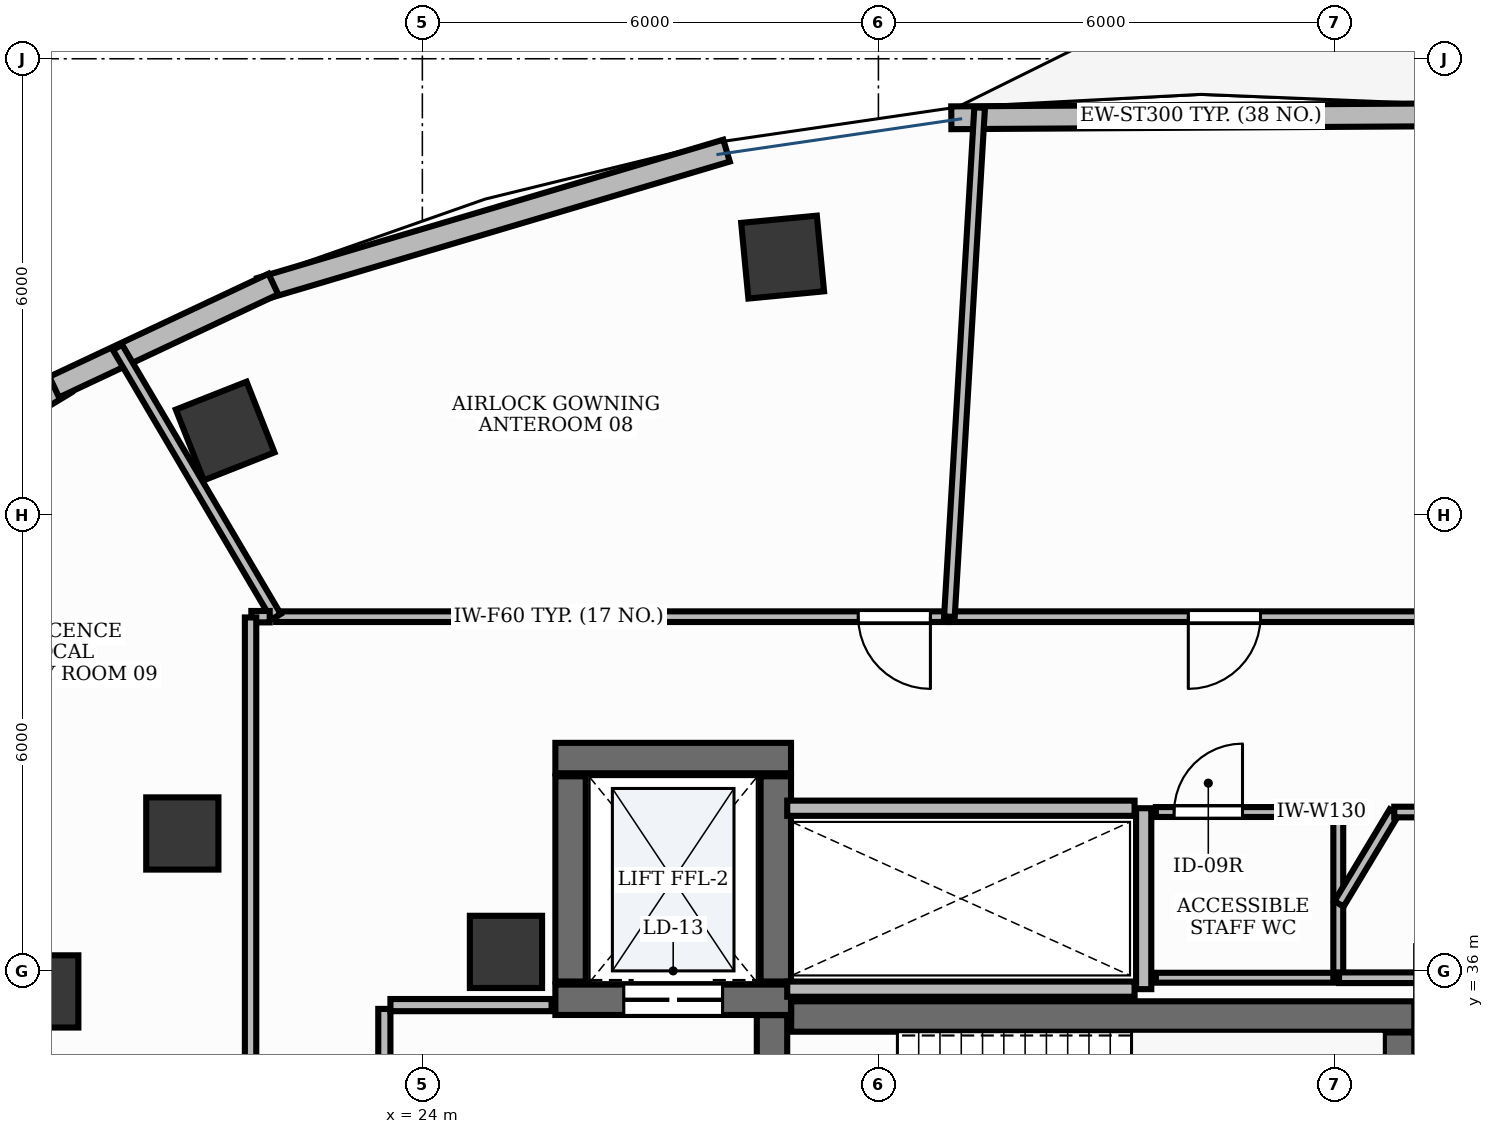
"""IFC4 building model, lengths in metres.
Left out: names, types, materials, properties, quantities, classifications, styles, units other than length and angle.
Written with IfcOpenShell. Run it as: python <this file> out.ifc"""

import sys

from ifc_helpers import new_model, si_unit, direction, frame, frame_2d, origin, origin_2d, place, context, subcontext, project, spatial, rectangle, extrude, element, fill, save


model = new_model("IFC4")
c1 = context("Model", 3, precision=1e-05, world=origin(), true_north=direction((0.0, 1.0)))
c2 = subcontext(c1, "Body", "Model", "MODEL_VIEW")
j1 = project(units=[si_unit("LENGTHUNIT", "METRE"), si_unit("PLANEANGLEUNIT", "RADIAN")], contexts=[c1])
p1 = place(None, origin())
s1 = spatial("IfcSite", under=j1, at=p1, CompositionType="ELEMENT")
p2 = place(p1, origin())
s2 = spatial("IfcBuilding", under=s1, at=p2, CompositionType="ELEMENT")
p3 = place(p2, frame((0.0, 0.0, 196.2)))
s3 = spatial("IfcBuildingStorey", under=s2, at=p3, CompositionType="ELEMENT", Elevation=196.2)
p4 = place(p3, frame((28.852, 35.4, 0.0), z_axis=(0.0, 0.0, 1.0), x_axis=(1.0, 0.0, 0.0)))
e1 = element("IfcWall", 1, at=p4, inside=s3, PredefinedType="SHEAR", context=c2, shape_type="SweptSolid", body=[
    extrude(rectangle(XDim=8.198, YDim=0.4, at=frame_2d((4.099, 0.0))), origin(), (0.0, 0.0, 1.0), 3.9),
])
p5 = place(p3, frame((36.85, 32.11, 0.0), z_axis=(0.0, 0.0, 1.0), x_axis=(0.0, 1.0, 0.0)))
e2 = element("IfcWall", 2, at=p5, inside=s3, PredefinedType="SHEAR", context=c2, shape_type="SweptSolid", body=[
    extrude(rectangle(XDim=3.08, YDim=0.4, at=frame_2d((1.54, 0.0))), origin(), (0.0, 0.0, 1.0), 3.9),
])
p6 = place(p3, frame((28.6, 32.11, 0.0), z_axis=(0.0, 0.0, 1.0), x_axis=(0.0, 1.0, 0.0)))
e3 = element("IfcWall", 3, at=p6, inside=s3, PredefinedType="SHEAR", context=c2, shape_type="SweptSolid", body=[
    extrude(rectangle(XDim=3.308, YDim=0.4, at=frame_2d((1.654, 0.0))), origin(), (0.0, 0.0, 1.0), 3.9),
])
p7 = place(p6, frame((0.2, 0.0, 0.0)))
e4 = element("IfcOpeningElement", 4, at=p7, cuts=e3, PredefinedType="OPENING", context=c2, shape_type="SweptSolid", body=[
    extrude(rectangle(XDim=1.05, YDim=2.15, at=frame_2d((0.525, 1.075))), frame((0.0, 0.215, 0.0), z_axis=(0.0, -1.0, 0.0), x_axis=(1.0, 0.0, 0.0)), (0.0, 0.0, 1.0), 0.43),
])
p8 = place(p3, frame((25.75, 38.8, 0.0), z_axis=(0.0, 0.0, 1.0), x_axis=(1.0, 0.0, 0.0)))
e5 = element("IfcWall", 5, at=p8, inside=s3, PredefinedType="SHEAR", context=c2, shape_type="SweptSolid", body=[
    extrude(rectangle(XDim=3.1, YDim=0.4, at=frame_2d((1.55, 0.0))), origin(), (0.0, 0.0, 1.0), 3.9),
])
p9 = place(p3, frame((25.75, 35.62, 0.0), z_axis=(0.0, 0.0, 1.0), x_axis=(1.0, 0.0, 0.0)))
e6 = element("IfcWall", 6, at=p9, inside=s3, PredefinedType="SHEAR", context=c2, shape_type="SweptSolid", body=[
    extrude(rectangle(XDim=3.1, YDim=0.4, at=frame_2d((1.55, 0.0))), origin(), (0.0, 0.0, 1.0), 3.9),
])
p10 = place(p9, frame((0.9, 0.0, 0.0)))
e7 = element("IfcOpeningElement", 7, at=p10, cuts=e6, PredefinedType="OPENING", context=c2, shape_type="SweptSolid", body=[
    extrude(rectangle(XDim=1.3, YDim=2.2, at=frame_2d((0.65, 1.1))), frame((0.0, 0.215, 0.0), z_axis=(0.0, -1.0, 0.0), x_axis=(1.0, 0.0, 0.0)), (0.0, 0.0, 1.0), 0.43),
])
for number, where, z_axis, x_axis in (
    (8, (25.95, 35.86, 0.0), (0.0, 0.0, 1.0), (0.0, 1.0, 0.0)),
    (9, (28.65, 35.86, 0.0), (0.0, 0.0, 1.0), (0.0, 1.0, 0.0)),
):
    element("IfcWall", number, at=place(p3, frame(where, z_axis=z_axis, x_axis=x_axis)), inside=s3, PredefinedType="SHEAR", context=c2, shape_type="SweptSolid", body=[
        extrude(rectangle(XDim=2.7, YDim=0.4, at=frame_2d((1.35, 0.0))), origin(), (0.0, 0.0, 1.0), 3.9),
    ])
p11 = place(p3, frame((25.1, 36.25, -0.0), z_axis=(0.0, 0.0, 1.0), x_axis=(1.0, 0.0, 0.0)))
e10 = element("IfcColumn", 10, at=p11, inside=s3, PredefinedType="PILASTER", context=c2, shape_type="SweptSolid", body=[
    extrude(rectangle(XDim=0.95, YDim=0.95, at=origin_2d()), origin(), (0.0, 0.0, 1.0), 3.901),
])
for number, where, z_axis, x_axis in (
    (11, (28.74, 45.39, -0.0), (0.0, 0.0, 1.0), (0.995, 0.095, 0.0)),
    (12, (21.406, 43.103, -0.0), (0.0, 0.0, 1.0), (0.93, 0.367, 0.0)),
):
    element("IfcColumn", number, at=place(p3, frame(where, z_axis=z_axis, x_axis=x_axis)), inside=s3, PredefinedType="COLUMN", context=c2, shape_type="SweptSolid", body=[
        extrude(rectangle(XDim=1.0, YDim=1.0, at=origin_2d()), origin(), (0.0, 0.0, 1.0), 3.901),
    ])
for number, where, z_axis, x_axis in (
    (13, (20.842, 37.808, -0.0), (0.0, 0.0, 1.0), (1.0, 0.0, 0.0)),
    (14, (19.0, 35.73, -0.0), (0.0, 0.0, 1.0), (1.0, 0.0, 0.0)),
):
    element("IfcColumn", number, at=place(p3, frame(where, z_axis=z_axis, x_axis=x_axis)), inside=s3, PredefinedType="COLUMN", context=c2, shape_type="SweptSolid", body=[
        extrude(rectangle(XDim=0.95, YDim=0.95, at=origin_2d()), origin(), (0.0, 0.0, 1.0), 3.901),
    ])
p12 = place(p3, frame((19.303, 43.736, 0.0), z_axis=(0.0, 0.0, 1.0), x_axis=(-0.85455658592, -0.519358297769, 0.0)))
e15 = element("IfcWall", 15, at=p12, inside=s3, PredefinedType="STANDARD", context=c2, shape_type="SweptSolid", body=[
    extrude(rectangle(XDim=3.066, YDim=0.3, at=frame_2d((1.533, 0.0))), origin(), (0.0, 0.0, 1.0), 3.9),
])
p13 = place(p12, frame((0.633, 0.0, 0.9)))
e16 = element("IfcOpeningElement", 16, at=p13, cuts=e15, PredefinedType="OPENING", context=c2, shape_type="SweptSolid", body=[
    extrude(rectangle(XDim=1.8, YDim=2.1, at=frame_2d((0.9, 1.05))), frame((0.0, 0.165, 0.0), z_axis=(0.0, -1.0, 0.0), x_axis=(1.0, 0.0, 0.0)), (0.0, 0.0, 1.0), 0.33),
])
p14 = place(p3, frame((37.527, 47.263, 0.0), z_axis=(0.0, 0.0, 1.0), x_axis=(-0.999982312698, -0.005947629086, 0.0)))
e17 = element("IfcWall", 17, at=p14, inside=s3, PredefinedType="STANDARD", context=c2, shape_type="SweptSolid", body=[
    extrude(rectangle(XDim=6.568, YDim=0.3, at=frame_2d((3.284, 0.0))), origin(), (0.0, 0.0, 1.0), 3.9),
])
p15 = place(p3, frame((28.002, 46.791, 0.0), z_axis=(0.0, 0.0, 1.0), x_axis=(-0.958672086524, -0.284513322218, 0.0)))
e18 = element("IfcWall", 18, at=p15, inside=s3, PredefinedType="STANDARD", context=c2, shape_type="SweptSolid", body=[
    extrude(rectangle(XDim=6.396, YDim=0.3, at=frame_2d((3.198, 0.0))), origin(), (0.0, 0.0, 1.0), 3.9),
])
p16 = place(p3, frame((22.04, 45.036, 0.0), z_axis=(0.0, 0.0, 1.0), x_axis=(-0.90504435143, -0.425317201561, 0.0)))
e19 = element("IfcWall", 19, at=p16, inside=s3, PredefinedType="STANDARD", context=c2, shape_type="SweptSolid", body=[
    extrude(rectangle(XDim=3.186, YDim=0.3, at=frame_2d((1.593, 0.0))), origin(), (0.0, 0.0, 1.0), 3.9),
])
p17 = place(p3, frame((33.49, 35.76, 0.0), z_axis=(0.0, 0.0, 1.0), x_axis=(0.0, 1.0, 0.0)))
e20 = element("IfcWall", 20, at=p17, inside=s3, PredefinedType="PARTITIONING", context=c2, shape_type="SweptSolid", body=[
    extrude(rectangle(XDim=2.38, YDim=0.2, at=frame_2d((1.19, 0.0))), origin(), (0.0, 0.0, 1.0), 2.22),
])
for number, where, z_axis, x_axis in (
    (21, (28.8, 35.76, 0.0), (0.0, 0.0, 1.0), (1.0, 0.0, 0.0)),
    (22, (28.8, 38.14, 0.0), (0.0, 0.0, 1.0), (1.0, 0.0, 0.0)),
):
    element("IfcWall", number, at=place(p3, frame(where, z_axis=z_axis, x_axis=x_axis)), inside=s3, PredefinedType="PARTITIONING", context=c2, shape_type="SweptSolid", body=[
        extrude(rectangle(XDim=4.57, YDim=0.2, at=frame_2d((2.285, 0.0))), origin(), (0.0, 0.0, 1.0), 2.22),
    ])
p18 = place(p3, frame((23.5, 32.1, 0.0), z_axis=(0.0, 0.0, 1.0), x_axis=(0.0, 1.0, 0.0)))
e23 = element("IfcWall", 23, at=p18, inside=s3, PredefinedType="PARTITIONING", context=c2, shape_type="SweptSolid", body=[
    extrude(rectangle(XDim=3.4, YDim=0.16, at=frame_2d((1.7, 0.0))), origin(), (0.0, 0.0, 1.0), 2.22),
])
p19 = place(p18, frame((1.175, 0.0, 0.0)))
e24 = element("IfcOpeningElement", 24, at=p19, cuts=e23, PredefinedType="OPENING", context=c2, shape_type="SweptSolid", body=[
    extrude(rectangle(XDim=1.05, YDim=2.15, at=frame_2d((0.525, 1.075))), frame((0.0, 0.095, 0.0), z_axis=(0.0, -1.0, 0.0), x_axis=(1.0, 0.0, 0.0)), (0.0, 0.0, 1.0), 0.19),
])
p20 = place(p3, frame((23.58, 35.55, 0.0), z_axis=(0.0, 0.0, 1.0), x_axis=(1.0, 0.0, 0.0)))
e25 = element("IfcWall", 25, at=p20, inside=s3, PredefinedType="PARTITIONING", context=c2, shape_type="SweptSolid", body=[
    extrude(rectangle(XDim=2.12, YDim=0.16, at=frame_2d((1.06, 0.0))), origin(), (0.0, 0.0, 1.0), 2.22),
])
p21 = place(p3, frame((33.65, 38.09, 0.0), z_axis=(0.0, 0.0, 1.0), x_axis=(1.0, 0.0, 0.0)))
e26 = element("IfcWall", 26, at=p21, inside=s3, PredefinedType="PARTITIONING", context=c2, shape_type="SweptSolid", body=[
    extrude(rectangle(XDim=2.4, YDim=0.13, at=frame_2d((1.2, 0.0))), origin(), (0.0, 0.0, 1.0), 2.22),
])
p22 = place(p21, frame((0.24, 0.0, 0.0)))
e27 = element("IfcOpeningElement", 27, at=p22, cuts=e26, PredefinedType="OPENING", context=c2, shape_type="SweptSolid", body=[
    extrude(rectangle(XDim=0.9, YDim=2.15, at=frame_2d((0.45, 1.075))), frame((0.0, 0.08, 0.0), z_axis=(0.0, -1.0, 0.0), x_axis=(1.0, 0.0, 0.0)), (0.0, 0.0, 1.0), 0.16),
])
p23 = place(p3, frame((37.2, 40.66, 0.0), z_axis=(0.0, 0.0, 1.0), x_axis=(-1.0, 0.0, 0.0)))
e28 = element("IfcWall", 28, at=p23, inside=s3, PredefinedType="PARTITIONING", context=c2, shape_type="SweptSolid", body=[
    extrude(rectangle(XDim=6.266, YDim=0.14, at=frame_2d((3.133, 0.0))), origin(), (0.0, 0.0, 1.0), 2.22),
])
p24 = place(p23, frame((2.173, 0.0, 0.0)))
e29 = element("IfcOpeningElement", 29, at=p24, cuts=e28, PredefinedType="OPENING", context=c2, shape_type="SweptSolid", body=[
    extrude(rectangle(XDim=0.95, YDim=2.15, at=frame_2d((0.475, 1.075))), frame((0.0, 0.085, 0.0), z_axis=(0.0, -1.0, 0.0), x_axis=(1.0, 0.0, 0.0)), (0.0, 0.0, 1.0), 0.17),
])
p25 = place(p3, frame((30.924, 40.66, 0.0), z_axis=(0.0, 0.0, 1.0), x_axis=(-1.0, 0.0, 0.0)))
e30 = element("IfcWall", 30, at=p25, inside=s3, PredefinedType="PARTITIONING", context=c2, shape_type="SweptSolid", body=[
    extrude(rectangle(XDim=8.848, YDim=0.14, at=frame_2d((4.424, 0.0))), origin(), (0.0, 0.0, 1.0), 2.22),
])
p26 = place(p25, frame((0.24, 0.0, 0.0)))
e31 = element("IfcOpeningElement", 31, at=p26, cuts=e30, PredefinedType="OPENING", context=c2, shape_type="SweptSolid", body=[
    extrude(rectangle(XDim=0.95, YDim=2.15, at=frame_2d((0.475, 1.075))), frame((0.0, 0.085, 0.0), z_axis=(0.0, -1.0, 0.0), x_axis=(1.0, 0.0, 0.0)), (0.0, 0.0, 1.0), 0.17),
])
p27 = place(p3, frame((36.05, 35.91, 0.0), z_axis=(0.0, 0.0, 1.0), x_axis=(-1.0, 0.0, 0.0)))
e32 = element("IfcWall", 32, at=p27, inside=s3, PredefinedType="PARTITIONING", context=c2, shape_type="SweptSolid", body=[
    extrude(rectangle(XDim=2.4, YDim=0.13, at=frame_2d((1.2, 0.0))), origin(), (0.0, 0.0, 1.0), 2.22),
])
p28 = place(p3, frame((36.05, 38.09, 0.0), z_axis=(0.0, 0.0, 1.0), x_axis=(0.0, -1.0, 0.0)))
e33 = element("IfcWall", 33, at=p28, inside=s3, PredefinedType="PARTITIONING", context=c2, shape_type="SweptSolid", body=[
    extrude(rectangle(XDim=2.18, YDim=0.13, at=frame_2d((1.09, 0.0))), origin(), (0.0, 0.0, 1.0), 2.22),
])
p29 = place(p3, frame((37.35, 35.91, 0.0), z_axis=(0.0, 0.0, 1.0), x_axis=(-1.0, 0.0, 0.0)))
e34 = element("IfcWall", 34, at=p29, inside=s3, PredefinedType="PARTITIONING", context=c2, shape_type="SweptSolid", body=[
    extrude(rectangle(XDim=1.29, YDim=0.14, at=frame_2d((0.645, 0.0))), origin(), (0.0, 0.0, 1.0), 2.22),
])
p30 = place(p3, frame((36.06, 36.881, 0.0), z_axis=(0.0, 0.0, 1.0), x_axis=(0.515055765628, 0.857156670798, 0.0)))
e35 = element("IfcWall", 35, at=p30, inside=s3, PredefinedType="PARTITIONING", context=c2, shape_type="SweptSolid", body=[
    extrude(rectangle(XDim=1.41, YDim=0.14, at=frame_2d((0.705, 0.0))), origin(), (0.0, 0.0, 1.0), 2.22),
])
p31 = place(p3, frame((36.786, 38.09, 0.0), z_axis=(0.0, 0.0, 1.0), x_axis=(1.0, 0.0, 0.0)))
e36 = element("IfcWall", 36, at=p31, inside=s3, PredefinedType="PARTITIONING", context=c2, shape_type="SweptSolid", body=[
    extrude(rectangle(XDim=0.414, YDim=0.14, at=frame_2d((0.207, 0.0))), origin(), (0.0, 0.0, 1.0), 2.22),
])
p32 = place(p3, frame((30.934, 40.66, 0.0), z_axis=(0.0, 0.0, 1.0), x_axis=(0.059274468421, 0.998241722928, 0.0)))
e37 = element("IfcWall", 37, at=p32, inside=s3, PredefinedType="PARTITIONING", context=c2, shape_type="SweptSolid", body=[
    extrude(rectangle(XDim=6.709, YDim=0.14, at=frame_2d((3.355, 0.0))), origin(), (0.0, 0.0, 1.0), 2.22),
])
p33 = place(p3, frame((22.076, 40.66, 0.0), z_axis=(0.0, 0.0, 1.0), x_axis=(-0.507538873586, 0.86162885966, 0.0)))
e38 = element("IfcWall", 38, at=p33, inside=s3, PredefinedType="PARTITIONING", context=c2, shape_type="SweptSolid", body=[
    extrude(rectangle(XDim=4.113, YDim=0.14, at=frame_2d((2.056, 0.0))), origin(), (0.0, 0.0, 1.0), 2.22),
])
p34 = place(p3, frame((21.992, 40.66, 0.0), z_axis=(0.0, 0.0, 1.0), x_axis=(-1.0, 0.0, 0.0)))
e39 = element("IfcWall", 39, at=p34, inside=s3, PredefinedType="PARTITIONING", context=c2, shape_type="SweptSolid", body=[
    extrude(rectangle(XDim=0.242, YDim=0.15, at=frame_2d((0.121, 0.0))), origin(), (0.0, 0.0, 1.0), 2.22),
])
p35 = place(p3, frame((21.74, 40.65, 0.0), z_axis=(0.0, 0.0, 1.0), x_axis=(0.0, -1.0, 0.0)))
e40 = element("IfcWall", 40, at=p35, inside=s3, PredefinedType="PARTITIONING", context=c2, shape_type="SweptSolid", body=[
    extrude(rectangle(XDim=5.85, YDim=0.15, at=frame_2d((2.925, 0.0))), origin(), (0.0, 0.0, 1.0), 2.22),
])
p36 = place(p10, origin())
e41 = element("IfcDoor", 41, at=p36, inside=s3, OperationType="DOUBLE_DOOR_SLIDING", PredefinedType="DOOR", context=c2, shape_type="SweptSolid", body=[
    extrude(rectangle(XDim=1.3, YDim=2.2, at=frame_2d((0.65, 1.1))), frame((0.0, 0.025, 0.0), z_axis=(0.0, -1.0, 0.0), x_axis=(1.0, 0.0, 0.0)), (0.0, 0.0, 1.0), 0.05),
])
fill(e7, e41)
p37 = place(p22, origin())
e42 = element("IfcDoor", 42, at=p37, inside=s3, OperationType="SINGLE_SWING_RIGHT", PredefinedType="DOOR", context=c2, shape_type="SweptSolid", body=[
    extrude(rectangle(XDim=0.9, YDim=2.15, at=frame_2d((0.45, 1.075))), frame((0.0, 0.025, 0.0), z_axis=(0.0, -1.0, 0.0), x_axis=(1.0, 0.0, 0.0)), (0.0, 0.0, 1.0), 0.05),
])
fill(e27, e42)
p38 = place(p24, origin())
e43 = element("IfcDoor", 43, at=p38, inside=s3, OperationType="SINGLE_SWING_RIGHT", PredefinedType="DOOR", context=c2, shape_type="SweptSolid", body=[
    extrude(rectangle(XDim=0.95, YDim=2.15, at=frame_2d((0.475, 1.075))), frame((0.0, 0.025, 0.0), z_axis=(0.0, -1.0, 0.0), x_axis=(1.0, 0.0, 0.0)), (0.0, 0.0, 1.0), 0.05),
])
fill(e29, e43)
p39 = place(p26, origin())
e44 = element("IfcDoor", 44, at=p39, inside=s3, OperationType="SINGLE_SWING_LEFT", PredefinedType="DOOR", context=c2, shape_type="SweptSolid", body=[
    extrude(rectangle(XDim=0.95, YDim=2.15, at=frame_2d((0.475, 1.075))), frame((0.0, 0.025, 0.0), z_axis=(0.0, -1.0, 0.0), x_axis=(1.0, 0.0, 0.0)), (0.0, 0.0, 1.0), 0.05),
])
fill(e31, e44)
save(model, sys.argv[1])
